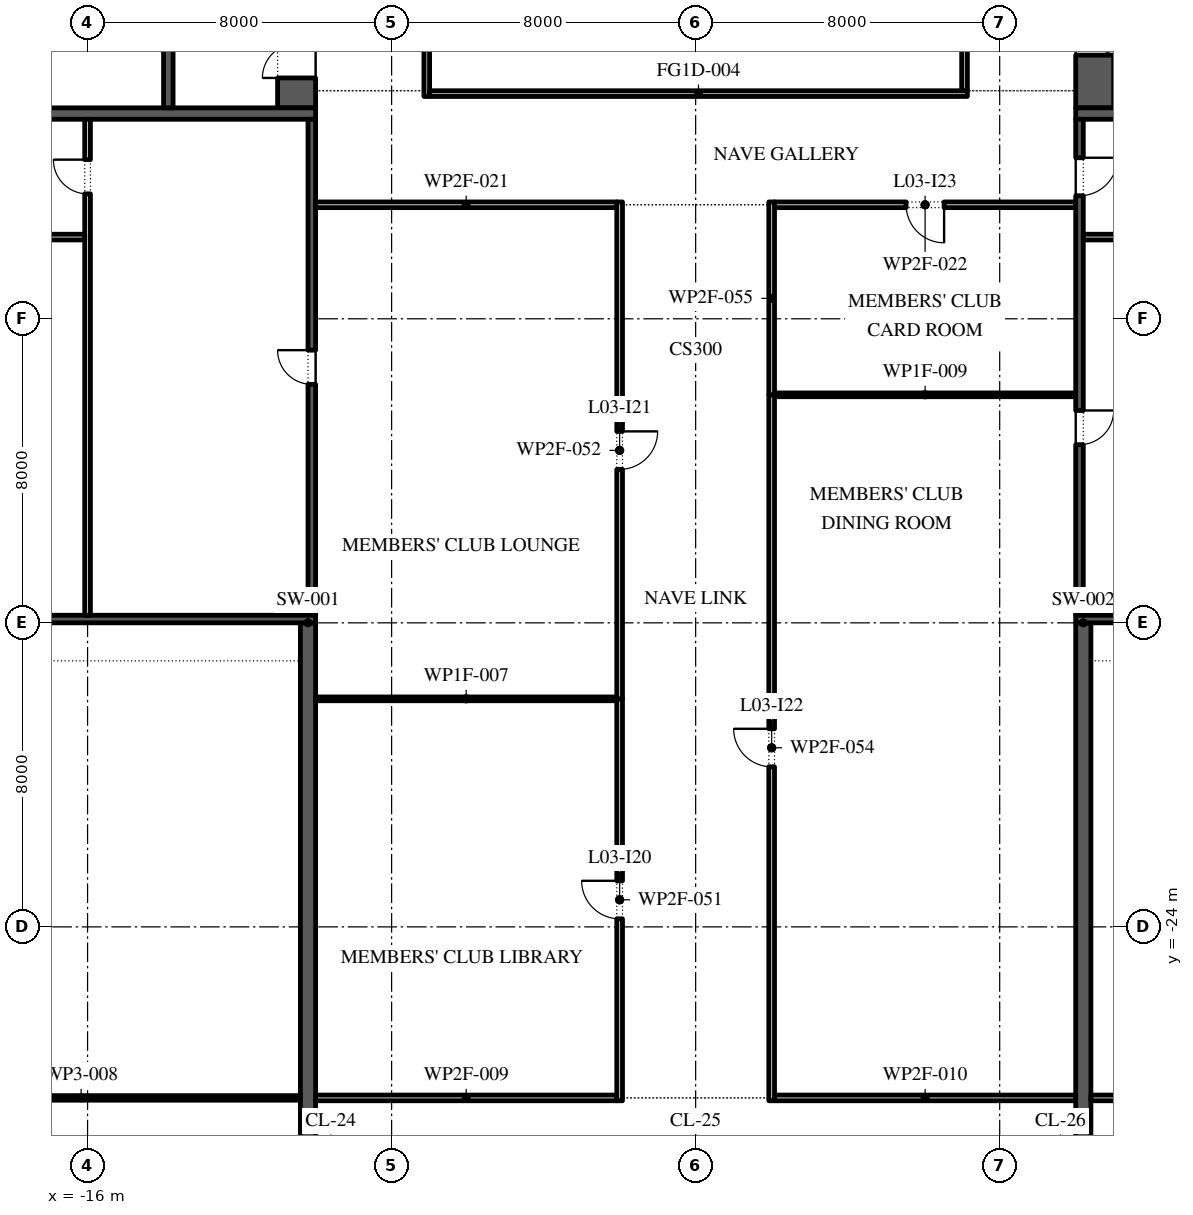
"""IFC4 building model, lengths in metres.
Left out: names, types, materials, properties, quantities, classifications, styles, units other than length and angle.
Written with IfcOpenShell. Run it as: python <this file> out.ifc"""

import sys

from ifc_helpers import new_model, si_unit, direction, frame, frame_2d, origin, place, context, subcontext, project, spatial, rectangle, extrude, element, fill, save


model = new_model("IFC4")
c1 = context("Model", 3, precision=1e-05, world=origin(), true_north=direction((0.0, 1.0)))
c2 = subcontext(c1, "Body", "Model", "MODEL_VIEW")
j1 = project(units=[si_unit("LENGTHUNIT", "METRE"), si_unit("PLANEANGLEUNIT", "RADIAN")], contexts=[c1])
p1 = place(None, origin())
s1 = spatial("IfcSite", under=j1, at=p1, CompositionType="ELEMENT")
p2 = place(p1, origin())
s2 = spatial("IfcBuilding", under=s1, at=p2, CompositionType="ELEMENT")
p3 = place(p2, frame((0.0, 0.0, 19.2)))
s3 = spatial("IfcBuildingStorey", under=s2, at=p3, CompositionType="ELEMENT", Elevation=19.2)
for number, where, z_axis, x_axis in (
    (1, (-10.2, -31.0, 0.0), (0.0, 0.0, 1.0), (0.0, 1.0, 0.0)),
    (2, (10.2, -31.0, 0.0), (0.0, 0.0, 1.0), (0.0, 1.0, 0.0)),
):
    element("IfcWall", number, at=place(p3, frame(where, z_axis=z_axis, x_axis=x_axis)), inside=s3, PredefinedType="SHEAR", context=c2, shape_type="SweptSolid", body=[
        extrude(rectangle(XDim=15.0, YDim=0.4, at=frame_2d((7.5, 0.0))), origin(), (0.0, 0.0, 1.0), 4.5),
    ])
p4 = place(p3, frame((-7.075, -2.15, 0.0), z_axis=(0.0, 0.0, 1.0), x_axis=(0.0, 1.0, 0.0)))
e3 = element("IfcWall", 3, at=p4, inside=s3, PredefinedType="STANDARD", context=c2, shape_type="SweptSolid", body=[
    extrude(rectangle(XDim=18.3, YDim=0.15, at=frame_2d((9.15, 0.0))), origin(), (0.0, 0.0, 1.0), 4.5),
])
p5 = place(p3, frame((7.075, 16.15, 0.0), z_axis=(0.0, 0.0, 1.0), x_axis=(0.0, -1.0, 0.0)))
e4 = element("IfcWall", 4, at=p5, inside=s3, PredefinedType="STANDARD", context=c2, shape_type="SweptSolid", body=[
    extrude(rectangle(XDim=18.15, YDim=0.15, at=frame_2d((9.075, 0.0))), origin(), (0.0, 0.0, 1.0), 4.5),
])
p6 = place(p3, frame((7.15, -2.075, 0.0), z_axis=(0.0, 0.0, 1.0), x_axis=(-1.0, 0.0, 0.0)))
e5 = element("IfcWall", 5, at=p6, inside=s3, PredefinedType="STANDARD", context=c2, shape_type="SweptSolid", body=[
    extrude(rectangle(XDim=14.15, YDim=0.15, at=frame_2d((7.075, 0.0))), origin(), (0.0, 0.0, 1.0), 3.52),
])
p7 = place(p3, frame((-10.5, -2.45, 0.0), z_axis=(0.0, 0.0, 1.0), x_axis=(0.0, 1.0, 0.0)))
e6 = element("IfcWall", 6, at=p7, inside=s3, PredefinedType="SHEAR", context=c2, shape_type="SweptSolid", body=[
    extrude(rectangle(XDim=27.9, YDim=1.0, at=frame_2d((13.95, 0.0))), origin(), (0.0, 0.0, 1.0), 4.5),
])
p8 = place(p7, frame((23.65, 0.0, 0.0)))
e7 = element("IfcOpeningElement", 7, at=p8, cuts=e6, PredefinedType="OPENING", context=c2, shape_type="SweptSolid", body=[
    extrude(rectangle(XDim=2.4, YDim=2.1, at=frame_2d((1.2, 1.05))), frame((0.0, 0.51, 0.0), z_axis=(0.0, -1.0, 0.0), x_axis=(1.0, 0.0, 0.0)), (0.0, 0.0, 1.0), 1.02),
])
p9 = place(p7, frame((0.788, 0.0, 0.0)))
e8 = element("IfcOpeningElement", 8, at=p9, cuts=e6, PredefinedType="OPENING", context=c2, shape_type="SweptSolid", body=[
    extrude(rectangle(XDim=0.9, YDim=2.1, at=frame_2d((0.45, 1.05))), frame((0.0, 0.51, 0.0), z_axis=(0.0, -1.0, 0.0), x_axis=(1.0, 0.0, 0.0)), (0.0, 0.0, 1.0), 1.02),
])
p10 = place(p7, frame((4.012, 0.0, 0.0)))
e9 = element("IfcOpeningElement", 9, at=p10, cuts=e6, PredefinedType="OPENING", context=c2, shape_type="SweptSolid", body=[
    extrude(rectangle(XDim=0.9, YDim=2.1, at=frame_2d((0.45, 1.05))), frame((0.0, 0.51, 0.0), z_axis=(0.0, -1.0, 0.0), x_axis=(1.0, 0.0, 0.0)), (0.0, 0.0, 1.0), 1.02),
])
p11 = place(p3, frame((-22.0, -2.6, 0.0), z_axis=(0.0, 0.0, 1.0), x_axis=(1.0, 0.0, 0.0)))
e10 = element("IfcWall", 10, at=p11, inside=s3, PredefinedType="SHEAR", context=c2, shape_type="SweptSolid", body=[
    extrude(rectangle(XDim=12.0, YDim=0.3, at=frame_2d((6.0, 0.0))), origin(), (0.0, 0.0, 1.0), 4.5),
])
p12 = place(p3, frame((-13.875, -2.45, 0.0), z_axis=(0.0, 0.0, 1.0), x_axis=(0.0, 1.0, 0.0)))
e11 = element("IfcWall", 11, at=p12, inside=s3, PredefinedType="SHEAR", context=c2, shape_type="SweptSolid", body=[
    extrude(rectangle(XDim=21.3, YDim=0.25, at=frame_2d((10.65, 0.0))), origin(), (0.0, 0.0, 1.0), 4.5),
])
p13 = place(p12, frame((10.396, 0.0, 0.0)))
e12 = element("IfcOpeningElement", 12, at=p13, cuts=e11, PredefinedType="OPENING", context=c2, shape_type="SweptSolid", body=[
    extrude(rectangle(XDim=0.9, YDim=2.1, at=frame_2d((0.45, 1.05))), frame((0.0, 0.135, 0.0), z_axis=(0.0, -1.0, 0.0), x_axis=(1.0, 0.0, 0.0)), (0.0, 0.0, 1.0), 0.27),
])
p14 = place(p12, frame((14.6, 0.0, 0.0)))
e13 = element("IfcOpeningElement", 13, at=p14, cuts=e11, PredefinedType="OPENING", context=c2, shape_type="SweptSolid", body=[
    extrude(rectangle(XDim=0.9, YDim=2.1, at=frame_2d((0.45, 1.05))), frame((0.0, 0.135, 0.0), z_axis=(0.0, -1.0, 0.0), x_axis=(1.0, 0.0, 0.0)), (0.0, 0.0, 1.0), 0.27),
])
p15 = place(p12, frame((18.775, 0.0, 0.0)))
e14 = element("IfcOpeningElement", 14, at=p15, cuts=e11, PredefinedType="OPENING", context=c2, shape_type="SweptSolid", body=[
    extrude(rectangle(XDim=0.9, YDim=2.1, at=frame_2d((0.45, 1.05))), frame((0.0, 0.135, 0.0), z_axis=(0.0, -1.0, 0.0), x_axis=(1.0, 0.0, 0.0)), (0.0, 0.0, 1.0), 0.27),
])
p16 = place(p12, frame((6.971, 0.0, 0.0)))
e15 = element("IfcOpeningElement", 15, at=p16, cuts=e11, PredefinedType="OPENING", context=c2, shape_type="SweptSolid", body=[
    extrude(rectangle(XDim=1.1, YDim=2.1, at=frame_2d((0.55, 1.05))), frame((0.0, 0.135, 0.0), z_axis=(0.0, -1.0, 0.0), x_axis=(1.0, 0.0, 0.0)), (0.0, 0.0, 1.0), 0.27),
])
p17 = place(p3, frame((-10.1, -15.8, 0.0), z_axis=(0.0, 0.0, 1.0), x_axis=(0.0, 1.0, 0.0)))
e16 = element("IfcWall", 16, at=p17, inside=s3, PredefinedType="SHEAR", context=c2, shape_type="SweptSolid", body=[
    extrude(rectangle(XDim=13.05, YDim=0.2, at=frame_2d((6.525, 0.0))), origin(), (0.0, 0.0, 1.0), 4.5),
])
p18 = place(p17, frame((6.075, 0.0, 0.0)))
e17 = element("IfcOpeningElement", 17, at=p18, cuts=e16, PredefinedType="OPENING", context=c2, shape_type="SweptSolid", body=[
    extrude(rectangle(XDim=0.9, YDim=2.1, at=frame_2d((0.45, 1.05))), frame((0.0, 0.11, 0.0), z_axis=(0.0, -1.0, 0.0), x_axis=(1.0, 0.0, 0.0)), (0.0, 0.0, 1.0), 0.22),
])
p19 = place(p3, frame((-22.0, -15.9, 0.0), z_axis=(0.0, 0.0, 1.0), x_axis=(1.0, 0.0, 0.0)))
e18 = element("IfcWall", 18, at=p19, inside=s3, PredefinedType="SHEAR", context=c2, shape_type="SweptSolid", body=[
    extrude(rectangle(XDim=12.0, YDim=0.2, at=frame_2d((6.0, 0.0))), origin(), (0.0, 0.0, 1.0), 4.5),
])
p20 = place(p3, frame((-16.0, -15.8, 0.0), z_axis=(0.0, 0.0, 1.0), x_axis=(0.0, 1.0, 0.0)))
e19 = element("IfcWall", 19, at=p20, inside=s3, PredefinedType="PARTITIONING", context=c2, shape_type="SweptSolid", body=[
    extrude(rectangle(XDim=13.05, YDim=0.15, at=frame_2d((6.525, 0.0))), origin(), (0.0, 0.0, 1.0), 4.5),
])
p21 = place(p20, frame((11.087, 0.0, 0.0)))
e20 = element("IfcOpeningElement", 20, at=p21, cuts=e19, PredefinedType="OPENING", context=c2, shape_type="SweptSolid", body=[
    extrude(rectangle(XDim=0.9, YDim=2.1, at=frame_2d((0.45, 1.05))), frame((0.0, 0.085, 0.0), z_axis=(0.0, -1.0, 0.0), x_axis=(1.0, 0.0, 0.0)), (0.0, 0.0, 1.0), 0.17),
])
p22 = place(p3, frame((-21.8, -5.85, 0.0), z_axis=(0.0, 0.0, 1.0), x_axis=(1.0, 0.0, 0.0)))
e21 = element("IfcWall", 21, at=p22, inside=s3, PredefinedType="PARTITIONING", context=c2, shape_type="SweptSolid", body=[
    extrude(rectangle(XDim=5.725, YDim=0.15, at=frame_2d((2.863, 0.0))), origin(), (0.0, 0.0, 1.0), 4.5),
])
p23 = place(p3, frame((10.5, -2.45, 0.0), z_axis=(0.0, 0.0, 1.0), x_axis=(0.0, 1.0, 0.0)))
e22 = element("IfcWall", 22, at=p23, inside=s3, PredefinedType="SHEAR", context=c2, shape_type="SweptSolid", body=[
    extrude(rectangle(XDim=27.9, YDim=1.0, at=frame_2d((13.95, 0.0))), origin(), (0.0, 0.0, 1.0), 4.5),
])
p24 = place(p23, frame((23.65, 0.0, 0.0)))
e23 = element("IfcOpeningElement", 23, at=p24, cuts=e22, PredefinedType="OPENING", context=c2, shape_type="SweptSolid", body=[
    extrude(rectangle(XDim=2.4, YDim=2.1, at=frame_2d((1.2, 1.05))), frame((0.0, 0.51, 0.0), z_axis=(0.0, -1.0, 0.0), x_axis=(1.0, 0.0, 0.0)), (0.0, 0.0, 1.0), 1.02),
])
p25 = place(p23, frame((1.387, 0.0, 0.0)))
e24 = element("IfcOpeningElement", 24, at=p25, cuts=e22, PredefinedType="OPENING", context=c2, shape_type="SweptSolid", body=[
    extrude(rectangle(XDim=0.9, YDim=2.1, at=frame_2d((0.45, 1.05))), frame((0.0, 0.51, 0.0), z_axis=(0.0, -1.0, 0.0), x_axis=(1.0, 0.0, 0.0)), (0.0, 0.0, 1.0), 1.02),
])
p26 = place(p23, frame((4.613, 0.0, 0.0)))
e25 = element("IfcOpeningElement", 25, at=p26, cuts=e22, PredefinedType="OPENING", context=c2, shape_type="SweptSolid", body=[
    extrude(rectangle(XDim=0.9, YDim=2.1, at=frame_2d((0.45, 1.05))), frame((0.0, 0.51, 0.0), z_axis=(0.0, -1.0, 0.0), x_axis=(1.0, 0.0, 0.0)), (0.0, 0.0, 1.0), 1.02),
])
p27 = place(p3, frame((10.0, -2.6, 0.0), z_axis=(0.0, 0.0, 1.0), x_axis=(1.0, 0.0, 0.0)))
e26 = element("IfcWall", 26, at=p27, inside=s3, PredefinedType="SHEAR", context=c2, shape_type="SweptSolid", body=[
    extrude(rectangle(XDim=12.0, YDim=0.3, at=frame_2d((6.0, 0.0))), origin(), (0.0, 0.0, 1.0), 4.5),
])
p28 = place(p3, frame((10.1, -15.8, 0.0), z_axis=(0.0, 0.0, 1.0), x_axis=(0.0, 1.0, 0.0)))
e27 = element("IfcWall", 27, at=p28, inside=s3, PredefinedType="SHEAR", context=c2, shape_type="SweptSolid", body=[
    extrude(rectangle(XDim=13.05, YDim=0.2, at=frame_2d((6.525, 0.0))), origin(), (0.0, 0.0, 1.0), 4.5),
])
p29 = place(p28, frame((4.488, 0.0, 0.0)))
e28 = element("IfcOpeningElement", 28, at=p29, cuts=e27, PredefinedType="OPENING", context=c2, shape_type="SweptSolid", body=[
    extrude(rectangle(XDim=0.9, YDim=2.1, at=frame_2d((0.45, 1.05))), frame((0.0, 0.11, 0.0), z_axis=(0.0, -1.0, 0.0), x_axis=(1.0, 0.0, 0.0)), (0.0, 0.0, 1.0), 0.22),
])
p30 = place(p28, frame((11.038, 0.0, 0.0)))
e29 = element("IfcOpeningElement", 29, at=p30, cuts=e27, PredefinedType="OPENING", context=c2, shape_type="SweptSolid", body=[
    extrude(rectangle(XDim=1.0, YDim=2.1, at=frame_2d((0.5, 1.05))), frame((0.0, 0.11, 0.0), z_axis=(0.0, -1.0, 0.0), x_axis=(1.0, 0.0, 0.0)), (0.0, 0.0, 1.0), 0.22),
])
p31 = place(p3, frame((10.0, -15.9, 0.0), z_axis=(0.0, 0.0, 1.0), x_axis=(1.0, 0.0, 0.0)))
e30 = element("IfcWall", 30, at=p31, inside=s3, PredefinedType="SHEAR", context=c2, shape_type="SweptSolid", body=[
    extrude(rectangle(XDim=12.0, YDim=0.2, at=frame_2d((6.0, 0.0))), origin(), (0.0, 0.0, 1.0), 4.5),
])
p32 = place(p3, frame((10.2, -5.85, 0.0), z_axis=(0.0, 0.0, 1.0), x_axis=(1.0, 0.0, 0.0)))
e31 = element("IfcWall", 31, at=p32, inside=s3, PredefinedType="PARTITIONING", context=c2, shape_type="SweptSolid", body=[
    extrude(rectangle(XDim=11.6, YDim=0.15, at=frame_2d((5.8, 0.0))), origin(), (0.0, 0.0, 1.0), 4.5),
])
p33 = place(p3, frame((-21.94, -28.5, 0.0), z_axis=(0.0, 0.0, 1.0), x_axis=(1.0, 0.0, 0.0)))
e32 = element("IfcWall", 32, at=p33, inside=s3, PredefinedType="PARTITIONING", context=c2, shape_type="SweptSolid", body=[
    extrude(rectangle(XDim=11.54, YDim=0.12, at=frame_2d((5.77, 0.0))), origin(), (0.0, 0.0, 1.0), 4.5),
])
for number, where, z_axis, x_axis in (
    (33, (-10.0, -28.5, 0.0), (0.0, 0.0, 1.0), (1.0, 0.0, 0.0)),
    (34, (2.075, -28.5, 0.0), (0.0, 0.0, 1.0), (1.0, 0.0, 0.0)),
):
    element("IfcWall", number, at=place(p3, frame(where, z_axis=z_axis, x_axis=x_axis)), inside=s3, PredefinedType="PARTITIONING", context=c2, shape_type="SweptSolid", body=[
        extrude(rectangle(XDim=7.925, YDim=0.15, at=frame_2d((3.962, 0.0))), origin(), (0.0, 0.0, 1.0), 4.5),
    ])
p34 = place(p3, frame((10.4, -28.5, 0.0), z_axis=(0.0, 0.0, 1.0), x_axis=(1.0, 0.0, 0.0)))
e35 = element("IfcWall", 35, at=p34, inside=s3, PredefinedType="PARTITIONING", context=c2, shape_type="SweptSolid", body=[
    extrude(rectangle(XDim=11.525, YDim=0.15, at=frame_2d((5.763, 0.0))), origin(), (0.0, 0.0, 1.0), 4.5),
])
for number, where, z_axis, x_axis in (
    (36, (-10.0, -18.0, 0.0), (0.0, 0.0, 1.0), (1.0, 0.0, 0.0)),
    (37, (2.075, -10.0, 0.0), (0.0, 0.0, 1.0), (1.0, 0.0, 0.0)),
):
    element("IfcWall", number, at=place(p3, frame(where, z_axis=z_axis, x_axis=x_axis)), inside=s3, PredefinedType="PARTITIONING", context=c2, shape_type="SweptSolid", body=[
        extrude(rectangle(XDim=7.925, YDim=0.1, at=frame_2d((3.962, 0.0))), origin(), (0.0, 0.0, 1.0), 4.5),
    ])
p35 = place(p3, frame((-10.0, -5.0, 0.0), z_axis=(0.0, 0.0, 1.0), x_axis=(1.0, 0.0, 0.0)))
e38 = element("IfcWall", 38, at=p35, inside=s3, PredefinedType="PARTITIONING", context=c2, shape_type="SweptSolid", body=[
    extrude(rectangle(XDim=7.925, YDim=0.15, at=frame_2d((3.962, 0.0))), origin(), (0.0, 0.0, 1.0), 4.5),
])
p36 = place(p3, frame((2.075, -5.0, 0.0), z_axis=(0.0, 0.0, 1.0), x_axis=(1.0, 0.0, 0.0)))
e39 = element("IfcWall", 39, at=p36, inside=s3, PredefinedType="PARTITIONING", context=c2, shape_type="SweptSolid", body=[
    extrude(rectangle(XDim=7.925, YDim=0.15, at=frame_2d((3.962, 0.0))), origin(), (0.0, 0.0, 1.0), 4.5),
])
p37 = place(p36, frame((3.462, 0.0, 0.0)))
e40 = element("IfcOpeningElement", 40, at=p37, cuts=e39, PredefinedType="OPENING", context=c2, shape_type="SweptSolid", body=[
    extrude(rectangle(XDim=1.0, YDim=2.1, at=frame_2d((0.5, 1.05))), frame((0.0, 0.085, 0.0), z_axis=(0.0, -1.0, 0.0), x_axis=(1.0, 0.0, 0.0)), (0.0, 0.0, 1.0), 0.17),
])
p38 = place(p3, frame((-2.0, -28.575, 0.0), z_axis=(0.0, 0.0, 1.0), x_axis=(0.0, 1.0, 0.0)))
e41 = element("IfcWall", 41, at=p38, inside=s3, PredefinedType="PARTITIONING", context=c2, shape_type="SweptSolid", body=[
    extrude(rectangle(XDim=10.575, YDim=0.15, at=frame_2d((5.288, 0.0))), origin(), (0.0, 0.0, 1.0), 4.5),
])
p39 = place(p38, frame((4.788, 0.0, 0.0)))
e42 = element("IfcOpeningElement", 42, at=p39, cuts=e41, PredefinedType="OPENING", context=c2, shape_type="SweptSolid", body=[
    extrude(rectangle(XDim=1.0, YDim=2.1, at=frame_2d((0.5, 1.05))), frame((0.0, 0.085, 0.0), z_axis=(0.0, -1.0, 0.0), x_axis=(1.0, 0.0, 0.0)), (0.0, 0.0, 1.0), 0.17),
])
p40 = place(p3, frame((-2.0, -18.0, 0.0), z_axis=(0.0, 0.0, 1.0), x_axis=(0.0, 1.0, 0.0)))
e43 = element("IfcWall", 43, at=p40, inside=s3, PredefinedType="PARTITIONING", context=c2, shape_type="SweptSolid", body=[
    extrude(rectangle(XDim=13.075, YDim=0.15, at=frame_2d((6.538, 0.0))), origin(), (0.0, 0.0, 1.0), 4.5),
])
p41 = place(p40, frame((6.038, 0.0, 0.0)))
e44 = element("IfcOpeningElement", 44, at=p41, cuts=e43, PredefinedType="OPENING", context=c2, shape_type="SweptSolid", body=[
    extrude(rectangle(XDim=1.0, YDim=2.1, at=frame_2d((0.5, 1.05))), frame((0.0, 0.085, 0.0), z_axis=(0.0, -1.0, 0.0), x_axis=(1.0, 0.0, 0.0)), (0.0, 0.0, 1.0), 0.17),
])
p42 = place(p3, frame((2.0, -28.575, 0.0), z_axis=(0.0, 0.0, 1.0), x_axis=(0.0, 1.0, 0.0)))
e45 = element("IfcWall", 45, at=p42, inside=s3, PredefinedType="PARTITIONING", context=c2, shape_type="SweptSolid", body=[
    extrude(rectangle(XDim=18.575, YDim=0.15, at=frame_2d((9.288, 0.0))), origin(), (0.0, 0.0, 1.0), 4.5),
])
p43 = place(p42, frame((8.788, 0.0, 0.0)))
e46 = element("IfcOpeningElement", 46, at=p43, cuts=e45, PredefinedType="OPENING", context=c2, shape_type="SweptSolid", body=[
    extrude(rectangle(XDim=1.0, YDim=2.1, at=frame_2d((0.5, 1.05))), frame((0.0, 0.085, 0.0), z_axis=(0.0, -1.0, 0.0), x_axis=(1.0, 0.0, 0.0)), (0.0, 0.0, 1.0), 0.17),
])
p44 = place(p3, frame((2.0, -10.0, 0.0), z_axis=(0.0, 0.0, 1.0), x_axis=(0.0, 1.0, 0.0)))
e47 = element("IfcWall", 47, at=p44, inside=s3, PredefinedType="PARTITIONING", context=c2, shape_type="SweptSolid", body=[
    extrude(rectangle(XDim=5.075, YDim=0.15, at=frame_2d((2.538, 0.0))), origin(), (0.0, 0.0, 1.0), 4.5),
])
p45 = place(p9, origin())
e48 = element("IfcDoor", 48, at=p45, inside=s3, OperationType="SINGLE_SWING_RIGHT", PredefinedType="DOOR", context=c2, shape_type="SweptSolid", body=[
    extrude(rectangle(XDim=0.9, YDim=2.1, at=frame_2d((0.45, 1.05))), frame((0.0, 0.5, 0.0), z_axis=(0.0, -1.0, 0.0), x_axis=(1.0, 0.0, 0.0)), (0.0, 0.0, 1.0), 0.05),
])
fill(e8, e48)
p46 = place(p21, origin())
e49 = element("IfcDoor", 49, at=p46, inside=s3, OperationType="SINGLE_SWING_LEFT", PredefinedType="DOOR", context=c2, shape_type="SweptSolid", body=[
    extrude(rectangle(XDim=0.9, YDim=2.1, at=frame_2d((0.45, 1.05))), frame((0.0, 0.025, 0.0), z_axis=(0.0, -1.0, 0.0), x_axis=(1.0, 0.0, 0.0)), (0.0, 0.0, 1.0), 0.05),
])
fill(e20, e49)
p47 = place(p18, origin())
e50 = element("IfcDoor", 50, at=p47, inside=s3, OperationType="SINGLE_SWING_LEFT", PredefinedType="DOOR", context=c2, shape_type="SweptSolid", body=[
    extrude(rectangle(XDim=0.9, YDim=2.1, at=frame_2d((0.45, 1.05))), frame((0.0, 0.1, 0.0), z_axis=(0.0, -1.0, 0.0), x_axis=(1.0, 0.0, 0.0)), (0.0, 0.0, 1.0), 0.05),
])
fill(e17, e50)
p48 = place(p25, frame((0.9, -0.95, 0.0), z_axis=(0.0, 0.0, 1.0), x_axis=(-1.0, 0.0, 0.0)))
e51 = element("IfcDoor", 51, at=p48, inside=s3, OperationType="SINGLE_SWING_RIGHT", PredefinedType="DOOR", context=c2, shape_type="SweptSolid", body=[
    extrude(rectangle(XDim=0.9, YDim=2.1, at=frame_2d((0.45, 1.05))), frame((0.0, -0.45, 0.0), z_axis=(0.0, -1.0, 0.0), x_axis=(1.0, 0.0, 0.0)), (0.0, 0.0, 1.0), 0.05),
])
fill(e24, e51)
p49 = place(p29, frame((0.9, -0.15, 0.0), z_axis=(0.0, 0.0, 1.0), x_axis=(-1.0, 0.0, 0.0)))
e52 = element("IfcDoor", 52, at=p49, inside=s3, OperationType="SINGLE_SWING_RIGHT", PredefinedType="DOOR", context=c2, shape_type="SweptSolid", body=[
    extrude(rectangle(XDim=0.9, YDim=2.1, at=frame_2d((0.45, 1.05))), frame((0.0, -0.05, 0.0), z_axis=(0.0, -1.0, 0.0), x_axis=(1.0, 0.0, 0.0)), (0.0, 0.0, 1.0), 0.05),
])
fill(e28, e52)
p50 = place(p30, frame((1.0, -0.15, 0.0), z_axis=(0.0, 0.0, 1.0), x_axis=(-1.0, 0.0, 0.0)))
e53 = element("IfcDoor", 53, at=p50, inside=s3, OperationType="SINGLE_SWING_RIGHT", PredefinedType="DOOR", context=c2, shape_type="SweptSolid", body=[
    extrude(rectangle(XDim=1.0, YDim=2.1, at=frame_2d((0.5, 1.05))), frame((0.0, -0.05, 0.0), z_axis=(0.0, -1.0, 0.0), x_axis=(1.0, 0.0, 0.0)), (0.0, 0.0, 1.0), 0.05),
])
fill(e29, e53)
p51 = place(p39, origin())
e54 = element("IfcDoor", 54, at=p51, inside=s3, OperationType="SINGLE_SWING_LEFT", PredefinedType="DOOR", context=c2, shape_type="SweptSolid", body=[
    extrude(rectangle(XDim=1.0, YDim=2.1, at=frame_2d((0.5, 1.05))), frame((0.0, 0.025, 0.0), z_axis=(0.0, -1.0, 0.0), x_axis=(1.0, 0.0, 0.0)), (0.0, 0.0, 1.0), 0.05),
])
fill(e42, e54)
p52 = place(p41, frame((1.0, 0.0, 0.0), z_axis=(0.0, 0.0, 1.0), x_axis=(-1.0, 0.0, 0.0)))
e55 = element("IfcDoor", 55, at=p52, inside=s3, OperationType="SINGLE_SWING_RIGHT", PredefinedType="DOOR", context=c2, shape_type="SweptSolid", body=[
    extrude(rectangle(XDim=1.0, YDim=2.1, at=frame_2d((0.5, 1.05))), frame((0.0, 0.025, 0.0), z_axis=(0.0, -1.0, 0.0), x_axis=(1.0, 0.0, 0.0)), (0.0, 0.0, 1.0), 0.05),
])
fill(e44, e55)
p53 = place(p43, origin())
e56 = element("IfcDoor", 56, at=p53, inside=s3, OperationType="SINGLE_SWING_LEFT", PredefinedType="DOOR", context=c2, shape_type="SweptSolid", body=[
    extrude(rectangle(XDim=1.0, YDim=2.1, at=frame_2d((0.5, 1.05))), frame((0.0, 0.025, 0.0), z_axis=(0.0, -1.0, 0.0), x_axis=(1.0, 0.0, 0.0)), (0.0, 0.0, 1.0), 0.05),
])
fill(e46, e56)
p54 = place(p37, frame((1.0, 0.0, 0.0), z_axis=(0.0, 0.0, 1.0), x_axis=(-1.0, 0.0, 0.0)))
e57 = element("IfcDoor", 57, at=p54, inside=s3, OperationType="SINGLE_SWING_RIGHT", PredefinedType="DOOR", context=c2, shape_type="SweptSolid", body=[
    extrude(rectangle(XDim=1.0, YDim=2.1, at=frame_2d((0.5, 1.05))), frame((0.0, 0.025, 0.0), z_axis=(0.0, -1.0, 0.0), x_axis=(1.0, 0.0, 0.0)), (0.0, 0.0, 1.0), 0.05),
])
fill(e40, e57)
save(model, sys.argv[1])
